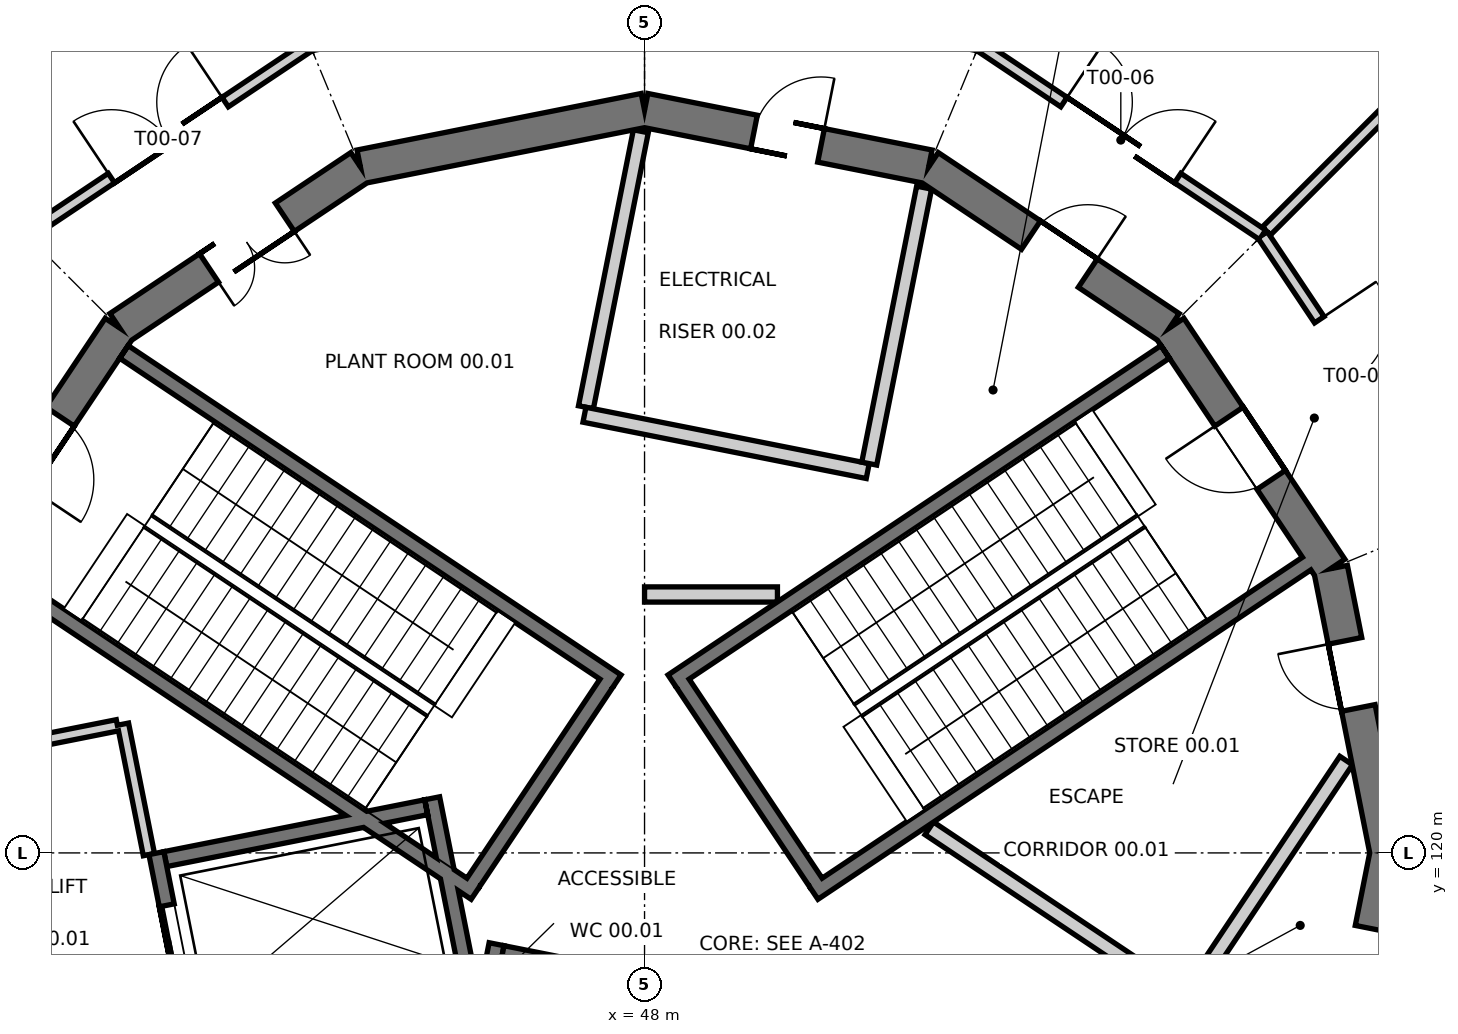
"""IFC4 building model, lengths in metres.
Left out: names, types, materials, properties, quantities, classifications, styles, units other than length and angle.
Written with IfcOpenShell. Run it as: python <this file> out.ifc"""

import sys

from ifc_helpers import new_model, si_unit, direction, frame, frame_2d, origin, place, context, subcontext, project, spatial, polyline, rectangle, outline, extrude, element, fill, save


model = new_model("IFC4")
c1 = context("Model", 3, precision=1e-05, world=origin(), true_north=direction((0.0, 1.0)))
c2 = subcontext(c1, "Body", "Model", "MODEL_VIEW")
j1 = project(units=[si_unit("LENGTHUNIT", "METRE"), si_unit("PLANEANGLEUNIT", "RADIAN")], contexts=[c1])
p1 = place(None, origin())
s1 = spatial("IfcSite", under=j1, at=p1, CompositionType="ELEMENT")
p2 = place(p1, origin())
s2 = spatial("IfcBuilding", under=s1, at=p2, CompositionType="ELEMENT")
p3 = place(p2, origin())
s3 = spatial("IfcBuildingStorey", under=s2, at=p3, CompositionType="ELEMENT", Elevation=0.0)
p4 = place(p3, frame((57.771, 120.0, 0.0), z_axis=(0.0, 0.0, 1.0), x_axis=(-0.195069197673, 0.98078948206, 0.0)))
e1 = element("IfcWall", 1, at=p4, inside=s3, PredefinedType="SHEAR", context=c2, shape_type="SweptSolid", body=[
    extrude(outline(polyline([(-0.045, -0.225), (3.857, -0.225), (3.768, 0.225), (0.045, 0.225), (-0.045, -0.225)])), origin(), (0.0, 0.0, 1.0), 6.0),
])
p5 = place(p4, frame((1.945, 0.0, 0.0)))
e2 = element("IfcOpeningElement", 2, at=p5, cuts=e1, PredefinedType="OPENING", context=c2, shape_type="SweptSolid", body=[
    extrude(rectangle(XDim=0.9, YDim=2.1, at=frame_2d((0.45, 1.05))), frame((0.0, 0.235, 0.0), z_axis=(0.0, -1.0, 0.0), x_axis=(1.0, 0.0, 0.0)), (0.0, 0.0, 1.0), 0.47),
])
p6 = place(p3, frame((57.027, 123.739, 0.0), z_axis=(0.0, 0.0, 1.0), x_axis=(-0.555542277102, 0.83148829117, 0.0)))
e3 = element("IfcWall", 3, at=p6, inside=s3, PredefinedType="SHEAR", context=c2, shape_type="SweptSolid", body=[
    extrude(outline(polyline([(-0.045, -0.225), (3.857, -0.225), (3.768, 0.225), (0.045, 0.225), (-0.045, -0.225)])), origin(), (0.0, 0.0, 1.0), 6.0),
])
p7 = place(p6, frame((1.406, 0.0, 0.0)))
e4 = element("IfcOpeningElement", 4, at=p7, cuts=e3, PredefinedType="OPENING", context=c2, shape_type="SweptSolid", body=[
    extrude(rectangle(XDim=1.0, YDim=2.1, at=frame_2d((0.5, 1.05))), frame((0.0, 0.235, 0.0), z_axis=(0.0, -1.0, 0.0), x_axis=(1.0, 0.0, 0.0)), (0.0, 0.0, 1.0), 0.47),
])
p8 = place(p3, frame((54.909, 126.909, 0.0), z_axis=(0.0, 0.0, 1.0), x_axis=(-0.83148829117, 0.555542277102, 0.0)))
e5 = element("IfcWall", 5, at=p8, inside=s3, PredefinedType="SHEAR", context=c2, shape_type="SweptSolid", body=[
    extrude(outline(polyline([(-0.045, -0.225), (3.857, -0.225), (3.768, 0.225), (0.045, 0.225), (-0.045, -0.225)])), origin(), (0.0, 0.0, 1.0), 6.0),
])
p9 = place(p8, frame((1.295, 0.0, 0.0)))
e6 = element("IfcOpeningElement", 6, at=p9, cuts=e5, PredefinedType="OPENING", context=c2, shape_type="SweptSolid", body=[
    extrude(rectangle(XDim=0.9, YDim=2.1, at=frame_2d((0.45, 1.05))), frame((0.0, 0.235, 0.0), z_axis=(0.0, -1.0, 0.0), x_axis=(1.0, 0.0, 0.0)), (0.0, 0.0, 1.0), 0.47),
])
p10 = place(p3, frame((51.739, 129.027, 0.0), z_axis=(0.0, 0.0, 1.0), x_axis=(-0.98078948206, 0.195069197673, 0.0)))
e7 = element("IfcWall", 7, at=p10, inside=s3, PredefinedType="SHEAR", context=c2, shape_type="SweptSolid", body=[
    extrude(outline(polyline([(-0.045, -0.225), (3.857, -0.225), (3.768, 0.225), (0.045, 0.225), (-0.045, -0.225)])), origin(), (0.0, 0.0, 1.0), 6.0),
])
p11 = place(p10, frame((1.445, 0.0, 0.0)))
e8 = element("IfcOpeningElement", 8, at=p11, cuts=e7, PredefinedType="OPENING", context=c2, shape_type="SweptSolid", body=[
    extrude(rectangle(XDim=0.9, YDim=2.1, at=frame_2d((0.45, 1.05))), frame((0.0, 0.235, 0.0), z_axis=(0.0, -1.0, 0.0), x_axis=(1.0, 0.0, 0.0)), (0.0, 0.0, 1.0), 0.47),
])
p12 = place(p3, frame((48.0, 129.771, 0.0), z_axis=(0.0, 0.0, 1.0), x_axis=(-0.98078948206, -0.195069197673, 0.0)))
e9 = element("IfcWall", 9, at=p12, inside=s3, PredefinedType="SHEAR", context=c2, shape_type="SweptSolid", body=[
    extrude(outline(polyline([(-0.045, -0.225), (3.857, -0.225), (3.768, 0.225), (0.045, 0.225), (-0.045, -0.225)])), origin(), (0.0, 0.0, 1.0), 6.0),
])
p13 = place(p3, frame((44.261, 129.027, 0.0), z_axis=(0.0, 0.0, 1.0), x_axis=(-0.83148829117, -0.555542277102, 0.0)))
e10 = element("IfcWall", 10, at=p13, inside=s3, PredefinedType="SHEAR", context=c2, shape_type="SweptSolid", body=[
    extrude(outline(polyline([(-0.045, -0.225), (3.857, -0.225), (3.768, 0.225), (0.045, 0.225), (-0.045, -0.225)])), origin(), (0.0, 0.0, 1.0), 6.0),
])
p14 = place(p13, frame((1.195, 0.0, 0.0)))
e11 = element("IfcOpeningElement", 11, at=p14, cuts=e10, PredefinedType="OPENING", context=c2, shape_type="SweptSolid", body=[
    extrude(rectangle(XDim=1.2, YDim=2.1, at=frame_2d((0.6, 1.05))), frame((0.0, 0.235, 0.0), z_axis=(0.0, -1.0, 0.0), x_axis=(1.0, 0.0, 0.0)), (0.0, 0.0, 1.0), 0.47),
])
p15 = place(p3, frame((41.091, 126.909, 0.0), z_axis=(0.0, 0.0, 1.0), x_axis=(-0.555542277102, -0.83148829117, 0.0)))
e12 = element("IfcWall", 12, at=p15, inside=s3, PredefinedType="SHEAR", context=c2, shape_type="SweptSolid", body=[
    extrude(outline(polyline([(-0.045, -0.225), (3.857, -0.225), (3.768, 0.225), (0.045, 0.225), (-0.045, -0.225)])), origin(), (0.0, 0.0, 1.0), 6.0),
])
p16 = place(p15, frame((1.406, 0.0, 0.0)))
e13 = element("IfcOpeningElement", 13, at=p16, cuts=e12, PredefinedType="OPENING", context=c2, shape_type="SweptSolid", body=[
    extrude(rectangle(XDim=1.0, YDim=2.1, at=frame_2d((0.5, 1.05))), frame((0.0, 0.235, 0.0), z_axis=(0.0, -1.0, 0.0), x_axis=(1.0, 0.0, 0.0)), (0.0, 0.0, 1.0), 0.47),
])
p17 = place(p3, frame((57.027, 116.261, 0.0), z_axis=(0.0, 0.0, 1.0), x_axis=(0.195069197673, 0.98078948206, 0.0)))
e14 = element("IfcWall", 14, at=p17, inside=s3, PredefinedType="SHEAR", context=c2, shape_type="SweptSolid", body=[
    extrude(outline(polyline([(-0.045, -0.225), (3.857, -0.225), (3.768, 0.225), (0.045, 0.225), (-0.045, -0.225)])), origin(), (0.0, 0.0, 1.0), 6.0),
])
p18 = place(p17, frame((1.895, 0.0, 0.0)))
e15 = element("IfcOpeningElement", 15, at=p18, cuts=e14, PredefinedType="OPENING", context=c2, shape_type="SweptSolid", body=[
    extrude(rectangle(XDim=0.9, YDim=2.1, at=frame_2d((0.45, 1.05))), frame((0.0, 0.235, 0.0), z_axis=(0.0, -1.0, 0.0), x_axis=(1.0, 0.0, 0.0)), (0.0, 0.0, 1.0), 0.47),
])
p19 = place(p3, frame((48.365, 122.258, 0.0), z_axis=(0.0, 0.0, 1.0), x_axis=(0.831476803301, 0.555559470779, 0.0)))
e16 = element("IfcWall", 16, at=p19, inside=s3, PredefinedType="SHEAR", context=c2, shape_type="SweptSolid", body=[
    extrude(rectangle(XDim=7.8, YDim=0.2, at=frame_2d((3.9, 0.0))), origin(), (0.0, 0.0, 1.0), 6.0),
])
p20 = place(p3, frame((50.226, 119.473, 0.0), z_axis=(0.0, 0.0, 1.0), x_axis=(0.831486463828, 0.555545012102, 0.0)))
e17 = element("IfcWall", 17, at=p20, inside=s3, PredefinedType="SHEAR", context=c2, shape_type="SweptSolid", body=[
    extrude(rectangle(XDim=7.8, YDim=0.2, at=frame_2d((3.9, 0.0))), origin(), (0.0, 0.0, 1.0), 6.0),
])
p21 = place(p3, frame((50.253, 119.612, 0.0), z_axis=(0.0, 0.0, 1.0), x_axis=(-0.55555842186, 0.831477504146, 0.0)))
e18 = element("IfcWall", 18, at=p21, inside=s3, PredefinedType="SHEAR", context=c2, shape_type="SweptSolid", body=[
    extrude(rectangle(XDim=3.15, YDim=0.2, at=frame_2d((1.575, 0.0))), origin(), (0.0, 0.0, 1.0), 6.0),
])
p22 = place(p3, frame((45.774, 119.473, 0.0), z_axis=(0.0, 0.0, 1.0), x_axis=(-0.831486463828, 0.555545012102, 0.0)))
e19 = element("IfcWall", 19, at=p22, inside=s3, PredefinedType="SHEAR", context=c2, shape_type="SweptSolid", body=[
    extrude(rectangle(XDim=7.8, YDim=0.2, at=frame_2d((3.9, 0.0))), origin(), (0.0, 0.0, 1.0), 6.0),
])
p23 = place(p3, frame((47.635, 122.258, 0.0), z_axis=(0.0, 0.0, 1.0), x_axis=(-0.831476803301, 0.555559470779, 0.0)))
e20 = element("IfcWall", 20, at=p23, inside=s3, PredefinedType="SHEAR", context=c2, shape_type="SweptSolid", body=[
    extrude(rectangle(XDim=7.8, YDim=0.2, at=frame_2d((3.9, 0.0))), origin(), (0.0, 0.0, 1.0), 6.0),
])
p24 = place(p3, frame((47.497, 122.231, 0.0), z_axis=(0.0, 0.0, 1.0), x_axis=(-0.55555842186, -0.831477504146, 0.0)))
e21 = element("IfcWall", 21, at=p24, inside=s3, PredefinedType="SHEAR", context=c2, shape_type="SweptSolid", body=[
    extrude(rectangle(XDim=3.15, YDim=0.2, at=frame_2d((1.575, 0.0))), origin(), (0.0, 0.0, 1.0), 6.0),
])
p25 = place(p3, frame((46.053, 118.799, 0.0), z_axis=(0.0, 0.0, 1.0), x_axis=(-0.195092759861, -0.980784795483, 0.0)))
e22 = element("IfcWall", 22, at=p25, inside=s3, PredefinedType="SHEAR", context=c2, shape_type="SweptSolid", body=[
    extrude(rectangle(XDim=7.8, YDim=0.2, at=frame_2d((3.9, 0.0))), origin(), (0.0, 0.0, 1.0), 6.0),
])
p26 = place(p3, frame((46.132, 118.681, 0.0), z_axis=(0.0, 0.0, 1.0), x_axis=(0.980785830564, -0.195087556151, 0.0)))
e23 = element("IfcWall", 23, at=p26, inside=s3, PredefinedType="SHEAR", context=c2, shape_type="SweptSolid", body=[
    extrude(rectangle(XDim=3.15, YDim=0.2, at=frame_2d((1.575, 0.0))), origin(), (0.0, 0.0, 1.0), 6.0),
])
p27 = place(p3, frame((41.577, 119.997, 0.0), z_axis=(0.0, 0.0, 1.0), x_axis=(0.195120673769, -0.980779242576, 0.0)))
e24 = element("IfcWall", 24, at=p27, inside=s3, PredefinedType="SHEAR", context=c2, shape_type="SweptSolid", body=[
    extrude(rectangle(XDim=2.5, YDim=0.2, at=frame_2d((1.25, 0.0))), origin(), (0.0, 0.0, 1.0), 6.0),
])
p28 = place(p27, frame((0.7, 0.0, 0.0)))
e25 = element("IfcOpeningElement", 25, at=p28, cuts=e24, PredefinedType="OPENING", context=c2, shape_type="SweptSolid", body=[
    extrude(rectangle(XDim=1.1, YDim=2.1, at=frame_2d((0.55, 1.05))), frame((0.0, 0.11, 0.0), z_axis=(0.0, -1.0, 0.0), x_axis=(1.0, 0.0, 0.0)), (0.0, 0.0, 1.0), 0.22),
])
p29 = place(p3, frame((45.206, 120.719, 0.0), z_axis=(0.0, 0.0, 1.0), x_axis=(0.195158270522, -0.980771762158, 0.0)))
e26 = element("IfcWall", 26, at=p29, inside=s3, PredefinedType="SHEAR", context=c2, shape_type="SweptSolid", body=[
    extrude(rectangle(XDim=2.647, YDim=0.2, at=frame_2d((1.323, 0.0))), origin(), (0.0, 0.0, 1.0), 6.0),
])
p30 = place(p3, frame((45.127, 120.601, 0.0), z_axis=(0.0, 0.0, 1.0), x_axis=(-0.980794727808, -0.195042820694, 0.0)))
e27 = element("IfcWall", 27, at=p30, inside=s3, PredefinedType="SHEAR", context=c2, shape_type="SweptSolid", body=[
    extrude(rectangle(XDim=3.5, YDim=0.2, at=frame_2d((1.75, 0.0))), origin(), (0.0, 0.0, 1.0), 6.0),
])
p31 = place(p3, frame((55.126, 118.065, 0.0), z_axis=(0.0, 0.0, 1.0), x_axis=(-0.831495502265, 0.555531483998, 0.0)))
e28 = element("IfcWall", 28, at=p31, inside=s3, PredefinedType="SOLIDWALL", context=c2, shape_type="SweptSolid", body=[
    extrude(rectangle(XDim=4.065, YDim=0.2, at=frame_2d((2.033, 0.0))), origin(), (0.0, 0.0, 1.0), 5.7),
])
p32 = place(p3, frame((57.231, 121.215, 0.0), z_axis=(0.0, 0.0, 1.0), x_axis=(-0.555600969312, -0.831449074147, 0.0)))
e29 = element("IfcWall", 29, at=p32, inside=s3, PredefinedType="SOLIDWALL", context=c2, shape_type="SweptSolid", body=[
    extrude(rectangle(XDim=3.689, YDim=0.2, at=frame_2d((1.844, 0.0))), origin(), (0.0, 0.0, 1.0), 5.7),
])
p33 = place(p3, frame((41.479, 119.977, 0.0), z_axis=(0.0, 0.0, 1.0), x_axis=(-0.19501613536, 0.98080003413, 0.0)))
e30 = element("IfcWall", 30, at=p33, inside=s3, PredefinedType="PARTITIONING", context=c2, shape_type="SweptSolid", body=[
    extrude(rectangle(XDim=1.75, YDim=0.15, at=frame_2d((0.875, 0.0))), origin(), (0.0, 0.0, 1.0), 5.7),
])
p34 = place(p3, frame((41.064, 121.679, 0.0), z_axis=(0.0, 0.0, 1.0), x_axis=(-0.980781272394, -0.195110470559, 0.0)))
e31 = element("IfcWall", 31, at=p34, inside=s3, PredefinedType="PARTITIONING", context=c2, shape_type="SweptSolid", body=[
    extrude(rectangle(XDim=2.381, YDim=0.15, at=frame_2d((1.19, 0.0))), origin(), (0.0, 0.0, 1.0), 5.7),
])
p35 = place(p3, frame((50.937, 125.024, 0.0), z_axis=(0.0, 0.0, 1.0), x_axis=(-0.980792608865, 0.195053475731, 0.0)))
e32 = element("IfcWall", 32, at=p35, inside=s3, PredefinedType="SOLIDWALL", context=c2, shape_type="SweptSolid", body=[
    extrude(rectangle(XDim=3.8, YDim=0.2, at=frame_2d((1.9, 0.0))), origin(), (0.0, 0.0, 1.0), 5.7),
])
p36 = place(p3, frame((47.229, 125.863, 0.0), z_axis=(0.0, 0.0, 1.0), x_axis=(0.195076065583, 0.980788116076, 0.0)))
e33 = element("IfcWall", 33, at=p36, inside=s3, PredefinedType="SOLIDWALL", context=c2, shape_type="SweptSolid", body=[
    extrude(rectangle(XDim=3.702, YDim=0.2, at=frame_2d((1.851, 0.0))), origin(), (0.0, 0.0, 1.0), 5.7),
])
p37 = place(p3, frame((51.678, 128.752, 0.0), z_axis=(0.0, 0.0, 1.0), x_axis=(-0.195088684223, -0.980785606179, 0.0)))
e34 = element("IfcWall", 34, at=p37, inside=s3, PredefinedType="SOLIDWALL", context=c2, shape_type="SweptSolid", body=[
    extrude(rectangle(XDim=3.702, YDim=0.2, at=frame_2d((1.851, 0.0))), origin(), (0.0, 0.0, 1.0), 5.7),
])
p38 = place(p3, frame((49.749, 123.4, 0.0), z_axis=(0.0, 0.0, 1.0), x_axis=(-1.0, 0.0, 0.0)))
e35 = element("IfcWall", 35, at=p38, inside=s3, PredefinedType="SOLIDWALL", context=c2, shape_type="SweptSolid", body=[
    extrude(rectangle(XDim=1.749, YDim=0.2, at=frame_2d((0.874, 0.0))), origin(), (0.0, 0.0, 1.0), 5.7),
])
p39 = place(p3, frame((56.132, 128.132, 0.0), z_axis=(0.0, 0.0, 1.0), x_axis=(0.555591382192, -0.831455480489, 0.0)))
e36 = element("IfcWall", 36, at=p39, inside=s3, PredefinedType="PARTITIONING", context=c2, shape_type="SweptSolid", body=[
    extrude(rectangle(XDim=4.487, YDim=0.15, at=frame_2d((2.244, 0.0))), origin(), (0.0, 0.0, 1.0), 5.7),
])
p40 = place(p39, frame((1.344, 0.0, 0.0)))
e37 = element("IfcOpeningElement", 37, at=p40, cuts=e36, PredefinedType="OPENING", context=c2, shape_type="SweptSolid", body=[
    extrude(rectangle(XDim=1.8, YDim=2.1, at=frame_2d((0.9, 1.05))), frame((0.0, 0.085, 0.0), z_axis=(0.0, -1.0, 0.0), x_axis=(1.0, 0.0, 0.0)), (0.0, 0.0, 1.0), 0.17),
])
p41 = place(p3, frame((52.401, 130.625, 0.0), z_axis=(0.0, 0.0, 1.0), x_axis=(0.831455480489, -0.555591382192, 0.0)))
e38 = element("IfcWall", 38, at=p41, inside=s3, PredefinedType="PARTITIONING", context=c2, shape_type="SweptSolid", body=[
    extrude(rectangle(XDim=4.487, YDim=0.15, at=frame_2d((2.244, 0.0))), origin(), (0.0, 0.0, 1.0), 5.7),
])
p42 = place(p41, frame((1.344, 0.0, 0.0)))
e39 = element("IfcOpeningElement", 39, at=p42, cuts=e38, PredefinedType="OPENING", context=c2, shape_type="SweptSolid", body=[
    extrude(rectangle(XDim=1.8, YDim=2.1, at=frame_2d((0.9, 1.05))), frame((0.0, 0.085, 0.0), z_axis=(0.0, -1.0, 0.0), x_axis=(1.0, 0.0, 0.0)), (0.0, 0.0, 1.0), 0.17),
])
p43 = place(p3, frame((39.868, 128.132, 0.0), z_axis=(0.0, 0.0, 1.0), x_axis=(0.831455480489, 0.555591382192, 0.0)))
e40 = element("IfcWall", 40, at=p43, inside=s3, PredefinedType="PARTITIONING", context=c2, shape_type="SweptSolid", body=[
    extrude(rectangle(XDim=4.487, YDim=0.15, at=frame_2d((2.244, 0.0))), origin(), (0.0, 0.0, 1.0), 5.7),
])
p44 = place(p43, frame((1.344, 0.0, 0.0)))
e41 = element("IfcOpeningElement", 41, at=p44, cuts=e40, PredefinedType="OPENING", context=c2, shape_type="SweptSolid", body=[
    extrude(rectangle(XDim=1.8, YDim=2.1, at=frame_2d((0.9, 1.05))), frame((0.0, 0.085, 0.0), z_axis=(0.0, -1.0, 0.0), x_axis=(1.0, 0.0, 0.0)), (0.0, 0.0, 1.0), 0.17),
])
p45 = place(p3, frame((56.182, 128.182, 0.0), z_axis=(0.0, 0.0, 1.0), x_axis=(0.707106781187, 0.707106781187, 0.0)))
e42 = element("IfcWall", 42, at=p45, inside=s3, PredefinedType="PARTITIONING", context=c2, shape_type="SweptSolid", body=[
    extrude(rectangle(XDim=5.938, YDim=0.15, at=frame_2d((2.969, 0.0))), origin(), (0.0, 0.0, 1.0), 4.9),
])
p46 = place(p7, origin())
e43 = element("IfcDoor", 43, at=p46, inside=s3, OperationType="SINGLE_SWING_RIGHT", PredefinedType="DOOR", context=c2, shape_type="SweptSolid", body=[
    extrude(rectangle(XDim=1.0, YDim=2.1, at=frame_2d((0.5, 1.05))), frame((0.0, 0.025, 0.0), z_axis=(0.0, -1.0, 0.0), x_axis=(1.0, 0.0, 0.0)), (0.0, 0.0, 1.0), 0.05),
])
fill(e4, e43)
p47 = place(p16, origin())
e44 = element("IfcDoor", 44, at=p47, inside=s3, OperationType="SINGLE_SWING_RIGHT", PredefinedType="DOOR", context=c2, shape_type="SweptSolid", body=[
    extrude(rectangle(XDim=1.0, YDim=2.1, at=frame_2d((0.5, 1.05))), frame((0.0, 0.025, 0.0), z_axis=(0.0, -1.0, 0.0), x_axis=(1.0, 0.0, 0.0)), (0.0, 0.0, 1.0), 0.05),
])
fill(e13, e44)
p48 = place(p28, origin())
e45 = element("IfcDoor", 45, at=p48, inside=s3, OperationType="SLIDING_TO_LEFT", PredefinedType="DOOR", context=c2, shape_type="SweptSolid", body=[
    extrude(rectangle(XDim=1.1, YDim=2.1, at=frame_2d((0.55, 1.05))), frame((0.0, 0.025, 0.0), z_axis=(0.0, -1.0, 0.0), x_axis=(1.0, 0.0, 0.0)), (0.0, 0.0, 1.0), 0.05),
])
fill(e25, e45)
p49 = place(p5, origin())
e46 = element("IfcDoor", 46, at=p49, inside=s3, OperationType="SINGLE_SWING_RIGHT", PredefinedType="DOOR", context=c2, shape_type="SweptSolid", body=[
    extrude(rectangle(XDim=0.9, YDim=2.1, at=frame_2d((0.45, 1.05))), frame((0.0, 0.025, 0.0), z_axis=(0.0, -1.0, 0.0), x_axis=(1.0, 0.0, 0.0)), (0.0, 0.0, 1.0), 0.05),
])
fill(e2, e46)
p50 = place(p18, frame((0.9, 0.0, 0.0), z_axis=(0.0, 0.0, 1.0), x_axis=(-1.0, 0.0, 0.0)))
e47 = element("IfcDoor", 47, at=p50, inside=s3, OperationType="SINGLE_SWING_RIGHT", PredefinedType="DOOR", context=c2, shape_type="SweptSolid", body=[
    extrude(rectangle(XDim=0.9, YDim=2.1, at=frame_2d((0.45, 1.05))), frame((0.0, 0.025, 0.0), z_axis=(0.0, -1.0, 0.0), x_axis=(1.0, 0.0, 0.0)), (0.0, 0.0, 1.0), 0.05),
])
fill(e15, e47)
p51 = place(p11, frame((0.9, 0.0, 0.0), z_axis=(0.0, 0.0, 1.0), x_axis=(-1.0, 0.0, 0.0)))
e48 = element("IfcDoor", 48, at=p51, inside=s3, OperationType="SINGLE_SWING_RIGHT", PredefinedType="DOOR", context=c2, shape_type="SweptSolid", body=[
    extrude(rectangle(XDim=0.9, YDim=2.1, at=frame_2d((0.45, 1.05))), frame((0.0, 0.025, 0.0), z_axis=(0.0, -1.0, 0.0), x_axis=(1.0, 0.0, 0.0)), (0.0, 0.0, 1.0), 0.05),
])
fill(e8, e48)
p52 = place(p14, origin())
e49 = element("IfcDoor", 49, at=p52, inside=s3, OperationType="DOUBLE_DOOR_SINGLE_SWING", PredefinedType="DOOR", context=c2, shape_type="SweptSolid", body=[
    extrude(rectangle(XDim=1.2, YDim=2.1, at=frame_2d((0.6, 1.05))), frame((0.0, 0.025, 0.0), z_axis=(0.0, -1.0, 0.0), x_axis=(1.0, 0.0, 0.0)), (0.0, 0.0, 1.0), 0.05),
])
fill(e11, e49)
p53 = place(p9, frame((0.9, 0.0, 0.0), z_axis=(0.0, 0.0, 1.0), x_axis=(-1.0, 0.0, 0.0)))
e50 = element("IfcDoor", 50, at=p53, inside=s3, OperationType="SINGLE_SWING_RIGHT", PredefinedType="DOOR", context=c2, shape_type="SweptSolid", body=[
    extrude(rectangle(XDim=0.9, YDim=2.1, at=frame_2d((0.45, 1.05))), frame((0.0, 0.025, 0.0), z_axis=(0.0, -1.0, 0.0), x_axis=(1.0, 0.0, 0.0)), (0.0, 0.0, 1.0), 0.05),
])
fill(e6, e50)
p54 = place(p40, origin())
e51 = element("IfcDoor", 51, at=p54, inside=s3, OperationType="DOUBLE_DOOR_SINGLE_SWING", PredefinedType="DOOR", context=c2, shape_type="SweptSolid", body=[
    extrude(rectangle(XDim=1.8, YDim=2.1, at=frame_2d((0.9, 1.05))), frame((0.0, 0.025, 0.0), z_axis=(0.0, -1.0, 0.0), x_axis=(1.0, 0.0, 0.0)), (0.0, 0.0, 1.0), 0.05),
])
fill(e37, e51)
p55 = place(p42, origin())
e52 = element("IfcDoor", 52, at=p55, inside=s3, OperationType="DOUBLE_DOOR_SINGLE_SWING", PredefinedType="DOOR", context=c2, shape_type="SweptSolid", body=[
    extrude(rectangle(XDim=1.8, YDim=2.1, at=frame_2d((0.9, 1.05))), frame((0.0, 0.025, 0.0), z_axis=(0.0, -1.0, 0.0), x_axis=(1.0, 0.0, 0.0)), (0.0, 0.0, 1.0), 0.05),
])
fill(e39, e52)
p56 = place(p44, origin())
e53 = element("IfcDoor", 53, at=p56, inside=s3, OperationType="DOUBLE_DOOR_SINGLE_SWING", PredefinedType="DOOR", context=c2, shape_type="SweptSolid", body=[
    extrude(rectangle(XDim=1.8, YDim=2.1, at=frame_2d((0.9, 1.05))), frame((0.0, 0.025, 0.0), z_axis=(0.0, -1.0, 0.0), x_axis=(1.0, 0.0, 0.0)), (0.0, 0.0, 1.0), 0.05),
])
fill(e41, e53)
save(model, sys.argv[1])
